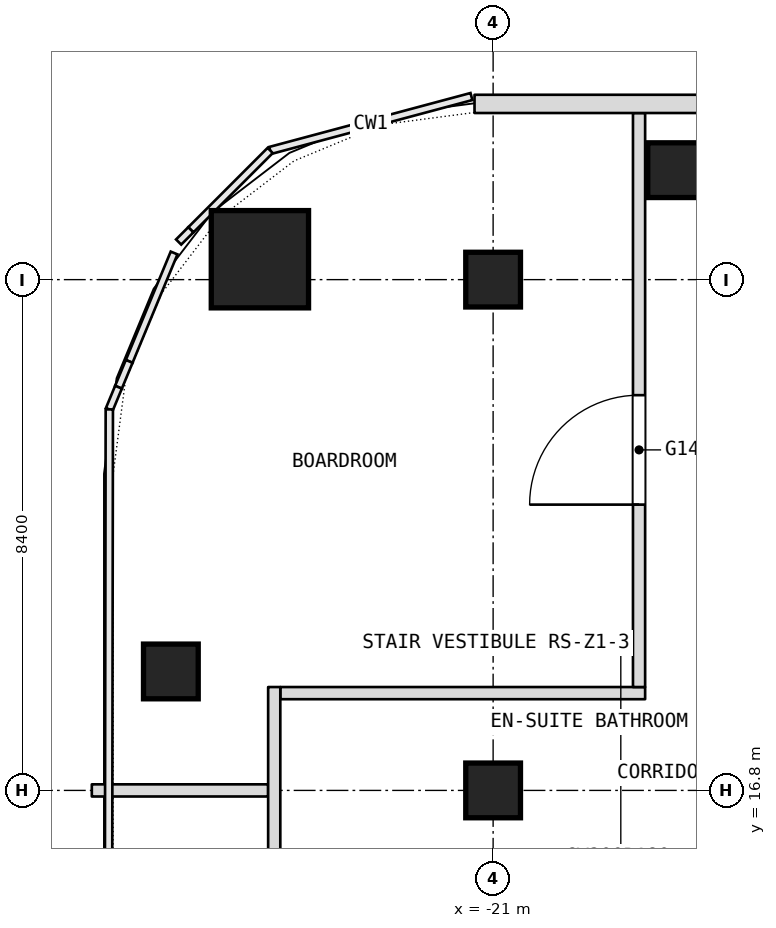
"""IFC4 building model, lengths in metres.
Left out: names, types, materials, properties, quantities, classifications, styles, units other than length and angle.
Written with IfcOpenShell. Run it as: python <this file> out.ifc"""

import sys

from ifc_helpers import new_model, si_unit, direction, frame, frame_2d, origin, origin_2d, place, context, subcontext, project, spatial, rectangle, extrude, element, fill, save


model = new_model("IFC4")
c1 = context("Model", 3, precision=1e-05, world=origin(), true_north=direction((0.0, 1.0)))
c2 = subcontext(c1, "Body", "Model", "MODEL_VIEW")
j1 = project(units=[si_unit("LENGTHUNIT", "METRE"), si_unit("PLANEANGLEUNIT", "RADIAN")], contexts=[c1])
p1 = place(None, origin())
s1 = spatial("IfcSite", under=j1, at=p1, CompositionType="ELEMENT")
p2 = place(p1, origin())
s2 = spatial("IfcBuilding", under=s1, at=p2, CompositionType="ELEMENT")
p3 = place(p2, frame((0.0, 0.0, 158.9)))
s3 = spatial("IfcBuildingStorey", under=s2, at=p3, CompositionType="ELEMENT", Elevation=158.9)
p4 = place(p3, frame((-24.835, 25.535, 0.0), z_axis=(0.0, 0.0, 1.0), x_axis=(1.0, 0.0, 0.0)))
e1 = element("IfcColumn", 1, at=p4, inside=s3, PredefinedType="COLUMN", context=c2, shape_type="SweptSolid", body=[
    extrude(rectangle(XDim=1.6, YDim=1.6, at=origin_2d()), origin(), (0.0, 0.0, 1.0), 3.6),
])
for number, where, z_axis, x_axis in (
    (2, (-21.0, 16.8, 0.0), (0.0, 0.0, 1.0), (1.0, 0.0, 0.0)),
    (3, (-21.0, 25.2, 0.0), (0.0, 0.0, 1.0), (1.0, 0.0, 0.0)),
    (4, (-26.3, 18.756, 0.0), (0.0, 0.0, 1.0), (1.0, 0.0, 0.0)),
    (5, (-18.007, 27.0, 0.0), (0.0, 0.0, 1.0), (1.0, 0.0, 0.0)),
):
    element("IfcColumn", number, at=place(p3, frame(where, z_axis=z_axis, x_axis=x_axis)), inside=s3, PredefinedType="COLUMN", context=c2, shape_type="SweptSolid", body=[
        extrude(rectangle(XDim=0.9, YDim=0.9, at=origin_2d()), origin(), (0.0, 0.0, 1.0), 3.6),
    ])
p5 = place(p3, frame((-27.6, 16.8, 0.0), z_axis=(0.0, 0.0, 1.0), x_axis=(1.0, 0.0, 0.0)))
e6 = element("IfcWall", 6, at=p5, inside=s3, PredefinedType="PARTITIONING", context=c2, shape_type="SweptSolid", body=[
    extrude(rectangle(XDim=2.9, YDim=0.2, at=frame_2d((1.45, 0.0))), origin(), (0.0, 0.0, 1.0), 2.89),
])
p6 = place(p3, frame((-24.5, 18.4, 0.0), z_axis=(0.0, 0.0, 1.0), x_axis=(1.0, 0.0, 0.0)))
e7 = element("IfcWall", 7, at=p6, inside=s3, PredefinedType="PARTITIONING", context=c2, shape_type="SweptSolid", body=[
    extrude(rectangle(XDim=6.0, YDim=0.2, at=frame_2d((3.0, 0.0))), origin(), (0.0, 0.0, 1.0), 3.34),
])
p7 = place(p3, frame((-18.6, 18.5, 0.0), z_axis=(0.0, 0.0, 1.0), x_axis=(0.0, 1.0, 0.0)))
e8 = element("IfcWall", 8, at=p7, inside=s3, PredefinedType="PARTITIONING", context=c2, shape_type="SweptSolid", body=[
    extrude(rectangle(XDim=9.44, YDim=0.2, at=frame_2d((4.72, 0.0))), origin(), (0.0, 0.0, 1.0), 3.34),
])
p8 = place(p7, frame((3.0, 0.0, 0.0)))
e9 = element("IfcOpeningElement", 9, at=p8, cuts=e8, PredefinedType="OPENING", context=c2, shape_type="SweptSolid", body=[
    extrude(rectangle(XDim=1.8, YDim=2.1, at=frame_2d((0.9, 1.05))), frame((0.0, 0.1, 0.0), z_axis=(0.0, -1.0, 0.0), x_axis=(1.0, 0.0, 0.0)), (0.0, 0.0, 1.0), 0.2),
])
p9 = place(p3, frame((-24.6, 6.9, 0.0), z_axis=(0.0, 0.0, 1.0), x_axis=(0.0, 1.0, 0.0)))
e10 = element("IfcWall", 10, at=p9, inside=s3, PredefinedType="PARTITIONING", context=c2, shape_type="SweptSolid", body=[
    extrude(rectangle(XDim=11.6, YDim=0.2, at=frame_2d((5.8, 0.0))), origin(), (0.0, 0.0, 1.0), 3.34),
])
p10 = place(p9, frame((5.45, 0.0, 0.0)))
e11 = element("IfcOpeningElement", 11, at=p10, cuts=e10, PredefinedType="OPENING", context=c2, shape_type="SweptSolid", body=[
    extrude(rectangle(XDim=1.8, YDim=2.1, at=frame_2d((0.9, 1.05))), frame((0.0, 0.1, 0.0), z_axis=(0.0, -1.0, 0.0), x_axis=(1.0, 0.0, 0.0)), (0.0, 0.0, 1.0), 0.2),
])
p11 = place(p3, frame((21.306, 28.09, 0.0), z_axis=(0.0, 0.0, 1.0), x_axis=(-1.0, 0.0, 0.0)))
e12 = element("IfcWall", 12, at=p11, inside=s3, PredefinedType="NOTDEFINED", context=c2, shape_type="SweptSolid", body=[
    extrude(rectangle(XDim=42.612, YDim=0.3, at=frame_2d((21.306, 0.0))), origin(), (0.0, 0.0, 1.0), 3.6),
])
p12 = place(p11, frame((5.406, 0.0, 0.9)))
e13 = element("IfcOpeningElement", 13, at=p12, cuts=e12, PredefinedType="OPENING", context=c2, shape_type="SweptSolid", body=[
    extrude(rectangle(XDim=2.4, YDim=2.1, at=frame_2d((1.2, 1.05))), frame((0.0, 0.15, 0.0), z_axis=(0.0, -1.0, 0.0), x_axis=(1.0, 0.0, 0.0)), (0.0, 0.0, 1.0), 0.3),
])
p13 = place(p11, frame((9.606, 0.0, 0.9)))
e14 = element("IfcOpeningElement", 14, at=p13, cuts=e12, PredefinedType="OPENING", context=c2, shape_type="SweptSolid", body=[
    extrude(rectangle(XDim=2.4, YDim=2.1, at=frame_2d((1.2, 1.05))), frame((0.0, 0.15, 0.0), z_axis=(0.0, -1.0, 0.0), x_axis=(1.0, 0.0, 0.0)), (0.0, 0.0, 1.0), 0.3),
])
p14 = place(p11, frame((13.806, 0.0, 0.9)))
e15 = element("IfcOpeningElement", 15, at=p14, cuts=e12, PredefinedType="OPENING", context=c2, shape_type="SweptSolid", body=[
    extrude(rectangle(XDim=2.4, YDim=2.1, at=frame_2d((1.2, 1.05))), frame((0.0, 0.15, 0.0), z_axis=(0.0, -1.0, 0.0), x_axis=(1.0, 0.0, 0.0)), (0.0, 0.0, 1.0), 0.3),
])
p15 = place(p11, frame((18.006, 0.0, 0.9)))
e16 = element("IfcOpeningElement", 16, at=p15, cuts=e12, PredefinedType="OPENING", context=c2, shape_type="SweptSolid", body=[
    extrude(rectangle(XDim=2.4, YDim=2.1, at=frame_2d((1.2, 1.05))), frame((0.0, 0.15, 0.0), z_axis=(0.0, -1.0, 0.0), x_axis=(1.0, 0.0, 0.0)), (0.0, 0.0, 1.0), 0.3),
])
p16 = place(p11, frame((22.206, 0.0, 0.9)))
e17 = element("IfcOpeningElement", 17, at=p16, cuts=e12, PredefinedType="OPENING", context=c2, shape_type="SweptSolid", body=[
    extrude(rectangle(XDim=2.4, YDim=2.1, at=frame_2d((1.2, 1.05))), frame((0.0, 0.15, 0.0), z_axis=(0.0, -1.0, 0.0), x_axis=(1.0, 0.0, 0.0)), (0.0, 0.0, 1.0), 0.3),
])
p17 = place(p11, frame((26.406, 0.0, 0.9)))
e18 = element("IfcOpeningElement", 18, at=p17, cuts=e12, PredefinedType="OPENING", context=c2, shape_type="SweptSolid", body=[
    extrude(rectangle(XDim=2.4, YDim=2.1, at=frame_2d((1.2, 1.05))), frame((0.0, 0.15, 0.0), z_axis=(0.0, -1.0, 0.0), x_axis=(1.0, 0.0, 0.0)), (0.0, 0.0, 1.0), 0.3),
])
p18 = place(p11, frame((30.606, 0.0, 0.9)))
e19 = element("IfcOpeningElement", 19, at=p18, cuts=e12, PredefinedType="OPENING", context=c2, shape_type="SweptSolid", body=[
    extrude(rectangle(XDim=2.4, YDim=2.1, at=frame_2d((1.2, 1.05))), frame((0.0, 0.15, 0.0), z_axis=(0.0, -1.0, 0.0), x_axis=(1.0, 0.0, 0.0)), (0.0, 0.0, 1.0), 0.3),
])
p19 = place(p11, frame((34.806, 0.0, 0.9)))
e20 = element("IfcOpeningElement", 20, at=p19, cuts=e12, PredefinedType="OPENING", context=c2, shape_type="SweptSolid", body=[
    extrude(rectangle(XDim=2.4, YDim=2.1, at=frame_2d((1.2, 1.05))), frame((0.0, 0.15, 0.0), z_axis=(0.0, -1.0, 0.0), x_axis=(1.0, 0.0, 0.0)), (0.0, 0.0, 1.0), 0.3),
])
p20 = place(p8, origin())
e21 = element("IfcDoor", 21, at=p20, inside=s3, OperationType="DOUBLE_DOOR_SINGLE_SWING", PredefinedType="DOOR", context=c2, shape_type="SweptSolid", body=[
    extrude(rectangle(XDim=1.8, YDim=2.1, at=frame_2d((0.9, 1.05))), frame((0.0, 0.025, 0.0), z_axis=(0.0, -1.0, 0.0), x_axis=(1.0, 0.0, 0.0)), (0.0, 0.0, 1.0), 0.05),
])
fill(e9, e21)
save(model, sys.argv[1])
